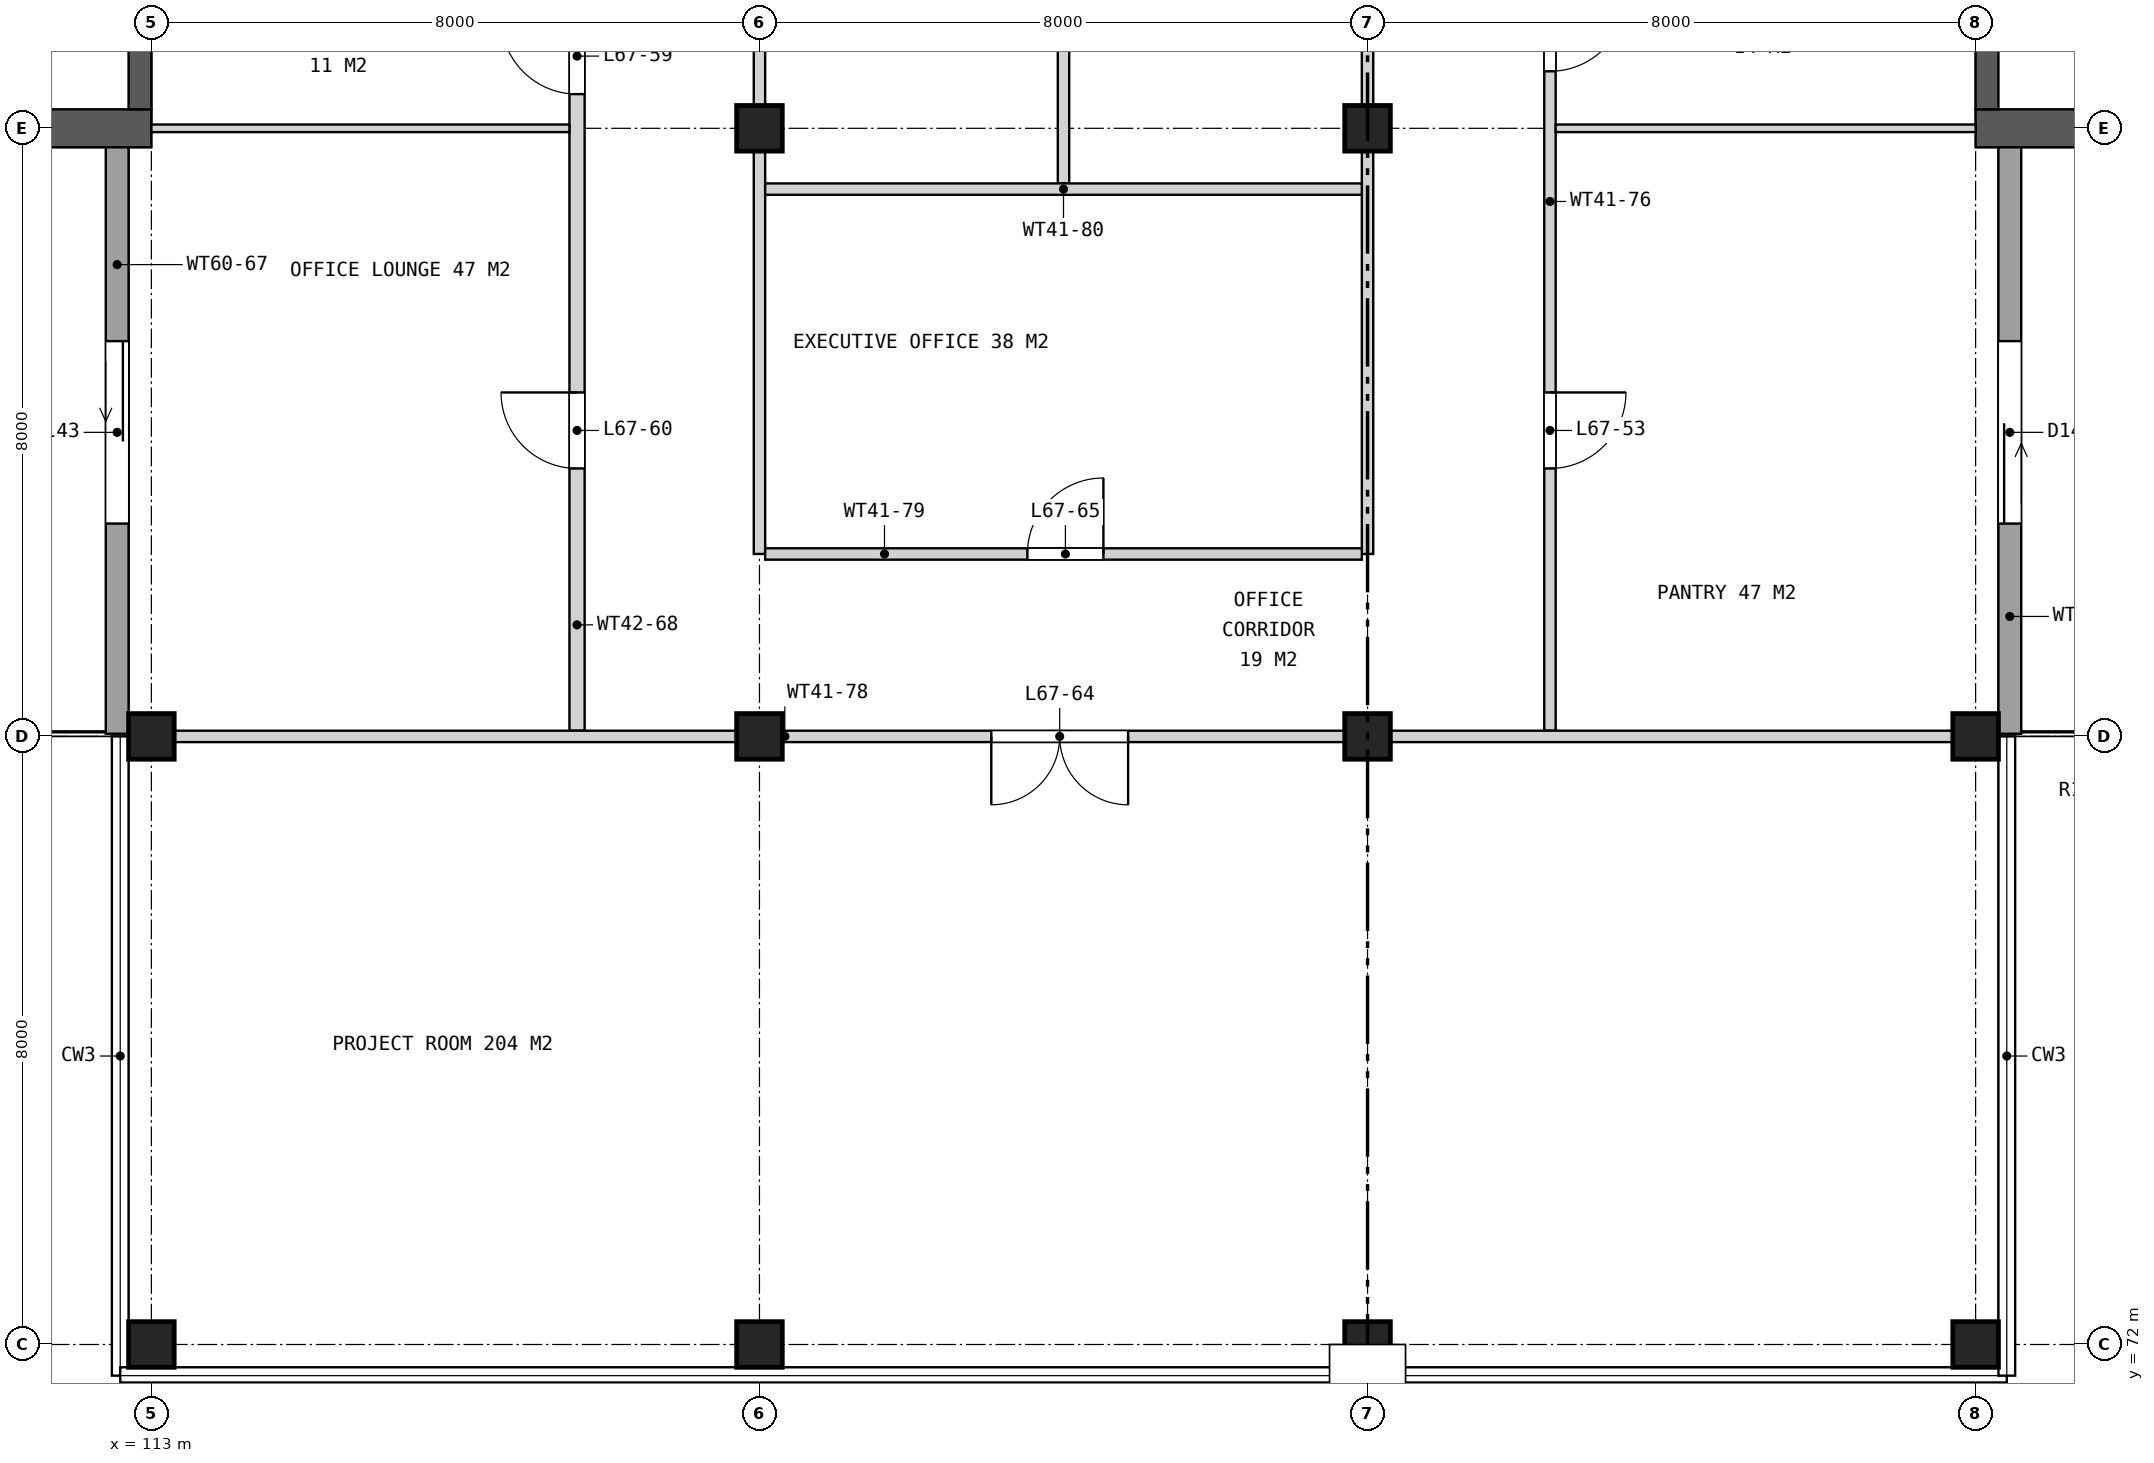
"""IFC4 building model, lengths in metres.
Left out: names, types, materials, properties, quantities, classifications, styles, units other than length and angle.
Written with IfcOpenShell. Run it as: python <this file> out.ifc"""

import sys

from ifc_helpers import new_model, si_unit, direction, frame, frame_2d, origin, origin_2d, place, context, subcontext, project, spatial, rectangle, extrude, element, fill, save


model = new_model("IFC4")
c1 = context("Model", 3, precision=1e-05, world=origin(), true_north=direction((0.0, 1.0)))
c2 = subcontext(c1, "Body", "Model", "MODEL_VIEW")
j1 = project(units=[si_unit("LENGTHUNIT", "METRE"), si_unit("PLANEANGLEUNIT", "RADIAN")], contexts=[c1])
p1 = place(None, origin())
s1 = spatial("IfcSite", under=j1, at=p1, CompositionType="ELEMENT")
p2 = place(p1, origin())
s2 = spatial("IfcBuilding", under=s1, at=p2, CompositionType="ELEMENT")
p3 = place(p2, frame((0.0, 0.0, 311.3)))
s3 = spatial("IfcBuildingStorey", under=s2, at=p3, CompositionType="ELEMENT", Elevation=311.3)
for number, where, z_axis, x_axis in (
    (1, (113.0, 72.0, 0.0), (0.0, 0.0, 1.0), (1.0, 0.0, 0.0)),
    (2, (113.0, 80.0, 0.0), (0.0, 0.0, 1.0), (1.0, 0.0, 0.0)),
    (3, (121.0, 72.0, 0.0), (0.0, 0.0, 1.0), (1.0, 0.0, 0.0)),
    (4, (121.0, 80.0, 0.0), (0.0, 0.0, 1.0), (1.0, 0.0, 0.0)),
    (5, (121.0, 88.0, 0.0), (0.0, 0.0, 1.0), (1.0, 0.0, 0.0)),
    (6, (129.0, 72.0, 0.0), (0.0, 0.0, 1.0), (1.0, 0.0, 0.0)),
    (7, (129.0, 80.0, 0.0), (0.0, 0.0, 1.0), (1.0, 0.0, 0.0)),
    (8, (129.0, 88.0, 0.0), (0.0, 0.0, 1.0), (1.0, 0.0, 0.0)),
    (9, (137.0, 72.0, 0.0), (0.0, 0.0, 1.0), (1.0, 0.0, 0.0)),
    (10, (137.0, 80.0, 0.0), (0.0, 0.0, 1.0), (1.0, 0.0, 0.0)),
):
    element("IfcColumn", number, at=place(p3, frame(where, z_axis=z_axis, x_axis=x_axis)), inside=s3, PredefinedType="COLUMN", context=c2, shape_type="SweptSolid", body=[
        extrude(rectangle(XDim=0.6, YDim=0.6, at=origin_2d()), origin(), (0.0, 0.0, 1.0), 4.2),
    ])
p4 = place(p3, frame((137.0, 88.0, 0.0), z_axis=(0.0, 0.0, 1.0), x_axis=(1.0, 0.0, 0.0)))
e11 = element("IfcWall", 11, at=p4, inside=s3, PredefinedType="SHEAR", context=c2, shape_type="SweptSolid", body=[
    extrude(rectangle(XDim=7.1, YDim=0.5, at=frame_2d((3.55, 0.0))), origin(), (0.0, 0.0, 1.0), 4.2),
])
p5 = place(p3, frame((137.15, 88.25, 0.0), z_axis=(0.0, 0.0, 1.0), x_axis=(0.0, 1.0, 0.0)))
e12 = element("IfcWall", 12, at=p5, inside=s3, PredefinedType="SHEAR", context=c2, shape_type="SweptSolid", body=[
    extrude(rectangle(XDim=6.05, YDim=0.3, at=frame_2d((3.025, 0.0))), origin(), (0.0, 0.0, 1.0), 4.2),
])
p6 = place(p3, frame((113.0, 88.0, 0.0), z_axis=(0.0, 0.0, 1.0), x_axis=(-1.0, 0.0, 0.0)))
e13 = element("IfcWall", 13, at=p6, inside=s3, PredefinedType="SHEAR", context=c2, shape_type="SweptSolid", body=[
    extrude(rectangle(XDim=7.1, YDim=0.5, at=frame_2d((3.55, 0.0))), origin(), (0.0, 0.0, 1.0), 4.2),
])
p7 = place(p3, frame((112.85, 94.3, 0.0), z_axis=(0.0, 0.0, 1.0), x_axis=(0.0, -1.0, 0.0)))
e14 = element("IfcWall", 14, at=p7, inside=s3, PredefinedType="SHEAR", context=c2, shape_type="SweptSolid", body=[
    extrude(rectangle(XDim=6.05, YDim=0.3, at=frame_2d((3.025, 0.0))), origin(), (0.0, 0.0, 1.0), 4.2),
])
p8 = place(p3, frame((112.55, 87.75, 0.0), z_axis=(0.0, 0.0, 1.0), x_axis=(0.0, -1.0, 0.0)))
e15 = element("IfcWall", 15, at=p8, inside=s3, PredefinedType="SOLIDWALL", context=c2, shape_type="SweptSolid", body=[
    extrude(rectangle(XDim=7.715, YDim=0.3, at=frame_2d((3.857, 0.0))), origin(), (0.0, 0.0, 1.0), 3.544),
])
p9 = place(p8, frame((2.55, 0.0, 0.0)))
e16 = element("IfcOpeningElement", 16, at=p9, cuts=e15, PredefinedType="OPENING", context=c2, shape_type="SweptSolid", body=[
    extrude(rectangle(XDim=2.4, YDim=2.4, at=frame_2d((1.2, 1.2))), frame((0.0, 0.16, 0.0), z_axis=(0.0, -1.0, 0.0), x_axis=(1.0, 0.0, 0.0)), (0.0, 0.0, 1.0), 0.32),
])
p10 = place(p3, frame((137.45, 80.035, 0.0), z_axis=(0.0, 0.0, 1.0), x_axis=(0.0, 1.0, 0.0)))
e17 = element("IfcWall", 17, at=p10, inside=s3, PredefinedType="SOLIDWALL", context=c2, shape_type="SweptSolid", body=[
    extrude(rectangle(XDim=7.715, YDim=0.3, at=frame_2d((3.857, 0.0))), origin(), (0.0, 0.0, 1.0), 3.544),
])
p11 = place(p10, frame((2.765, 0.0, 0.0)))
e18 = element("IfcOpeningElement", 18, at=p11, cuts=e17, PredefinedType="OPENING", context=c2, shape_type="SweptSolid", body=[
    extrude(rectangle(XDim=2.4, YDim=2.4, at=frame_2d((1.2, 1.2))), frame((0.0, 0.16, 0.0), z_axis=(0.0, -1.0, 0.0), x_axis=(1.0, 0.0, 0.0)), (0.0, 0.0, 1.0), 0.32),
])
p12 = place(p3, frame((118.6, 80.075, 0.0), z_axis=(0.0, 0.0, 1.0), x_axis=(0.0, 1.0, 0.0)))
e19 = element("IfcWall", 19, at=p12, inside=s3, PredefinedType="SOLIDWALL", context=c2, shape_type="SweptSolid", body=[
    extrude(rectangle(XDim=13.925, YDim=0.2, at=frame_2d((6.962, 0.0))), origin(), (0.0, 0.0, 1.0), 3.443),
])
p13 = place(p12, frame((12.375, 0.0, 0.0)))
e20 = element("IfcOpeningElement", 20, at=p13, cuts=e19, PredefinedType="OPENING", context=c2, shape_type="SweptSolid", body=[
    extrude(rectangle(XDim=1.0, YDim=2.1, at=frame_2d((0.5, 1.05))), frame((0.0, 0.11, 0.0), z_axis=(0.0, -1.0, 0.0), x_axis=(1.0, 0.0, 0.0)), (0.0, 0.0, 1.0), 0.22),
])
p14 = place(p12, frame((10.375, 0.0, 0.0)))
e21 = element("IfcOpeningElement", 21, at=p14, cuts=e19, PredefinedType="OPENING", context=c2, shape_type="SweptSolid", body=[
    extrude(rectangle(XDim=1.0, YDim=2.1, at=frame_2d((0.5, 1.05))), frame((0.0, 0.11, 0.0), z_axis=(0.0, -1.0, 0.0), x_axis=(1.0, 0.0, 0.0)), (0.0, 0.0, 1.0), 0.22),
])
p15 = place(p12, frame((8.375, 0.0, 0.0)))
e22 = element("IfcOpeningElement", 22, at=p15, cuts=e19, PredefinedType="OPENING", context=c2, shape_type="SweptSolid", body=[
    extrude(rectangle(XDim=1.0, YDim=2.1, at=frame_2d((0.5, 1.05))), frame((0.0, 0.11, 0.0), z_axis=(0.0, -1.0, 0.0), x_axis=(1.0, 0.0, 0.0)), (0.0, 0.0, 1.0), 0.22),
])
p16 = place(p12, frame((3.45, 0.0, 0.0)))
e23 = element("IfcOpeningElement", 23, at=p16, cuts=e19, PredefinedType="OPENING", context=c2, shape_type="SweptSolid", body=[
    extrude(rectangle(XDim=1.0, YDim=2.1, at=frame_2d((0.5, 1.05))), frame((0.0, 0.11, 0.0), z_axis=(0.0, -1.0, 0.0), x_axis=(1.0, 0.0, 0.0)), (0.0, 0.0, 1.0), 0.22),
])
p17 = place(p3, frame((121.0, 82.4, 0.0), z_axis=(0.0, 0.0, 1.0), x_axis=(0.0, 1.0, 0.0)))
e24 = element("IfcWall", 24, at=p17, inside=s3, PredefinedType="PARTITIONING", context=c2, shape_type="SweptSolid", body=[
    extrude(rectangle(XDim=35.2, YDim=0.15, at=frame_2d((17.6, 0.0))), origin(), (0.0, 0.0, 1.0), 3.443),
])
p18 = place(p17, frame((8.25, 0.0, 0.0)))
e25 = element("IfcOpeningElement", 25, at=p18, cuts=e24, PredefinedType="OPENING", context=c2, shape_type="SweptSolid", body=[
    extrude(rectangle(XDim=1.0, YDim=2.1, at=frame_2d((0.5, 1.05))), frame((0.0, 0.085, 0.0), z_axis=(0.0, -1.0, 0.0), x_axis=(1.0, 0.0, 0.0)), (0.0, 0.0, 1.0), 0.17),
])
p19 = place(p17, frame((22.15, 0.0, 0.0)))
e26 = element("IfcOpeningElement", 26, at=p19, cuts=e24, PredefinedType="OPENING", context=c2, shape_type="SweptSolid", body=[
    extrude(rectangle(XDim=1.0, YDim=2.1, at=frame_2d((0.5, 1.05))), frame((0.0, 0.085, 0.0), z_axis=(0.0, -1.0, 0.0), x_axis=(1.0, 0.0, 0.0)), (0.0, 0.0, 1.0), 0.17),
])
p20 = place(p17, frame((26.35, 0.0, 0.0)))
e27 = element("IfcOpeningElement", 27, at=p20, cuts=e24, PredefinedType="OPENING", context=c2, shape_type="SweptSolid", body=[
    extrude(rectangle(XDim=1.0, YDim=2.1, at=frame_2d((0.5, 1.05))), frame((0.0, 0.085, 0.0), z_axis=(0.0, -1.0, 0.0), x_axis=(1.0, 0.0, 0.0)), (0.0, 0.0, 1.0), 0.17),
])
p21 = place(p3, frame((125.0, 87.275, 0.0), z_axis=(0.0, 0.0, 1.0), x_axis=(0.0, 1.0, 0.0)))
e28 = element("IfcWall", 28, at=p21, inside=s3, PredefinedType="PARTITIONING", context=c2, shape_type="SweptSolid", body=[
    extrude(rectangle(XDim=7.85, YDim=0.15, at=frame_2d((3.925, 0.0))), origin(), (0.0, 0.0, 1.0), 3.443),
])
p22 = place(p3, frame((129.0, 82.4, 0.0), z_axis=(0.0, 0.0, 1.0), x_axis=(0.0, 1.0, 0.0)))
e29 = element("IfcWall", 29, at=p22, inside=s3, PredefinedType="PARTITIONING", context=c2, shape_type="SweptSolid", body=[
    extrude(rectangle(XDim=35.2, YDim=0.15, at=frame_2d((17.6, 0.0))), origin(), (0.0, 0.0, 1.0), 3.443),
])
p23 = place(p22, frame((8.25, 0.0, 0.0)))
e30 = element("IfcOpeningElement", 30, at=p23, cuts=e29, PredefinedType="OPENING", context=c2, shape_type="SweptSolid", body=[
    extrude(rectangle(XDim=1.0, YDim=2.1, at=frame_2d((0.5, 1.05))), frame((0.0, 0.085, 0.0), z_axis=(0.0, -1.0, 0.0), x_axis=(1.0, 0.0, 0.0)), (0.0, 0.0, 1.0), 0.17),
])
p24 = place(p22, frame((15.85, 0.0, 0.0)))
e31 = element("IfcOpeningElement", 31, at=p24, cuts=e29, PredefinedType="OPENING", context=c2, shape_type="SweptSolid", body=[
    extrude(rectangle(XDim=1.0, YDim=2.1, at=frame_2d((0.5, 1.05))), frame((0.0, 0.085, 0.0), z_axis=(0.0, -1.0, 0.0), x_axis=(1.0, 0.0, 0.0)), (0.0, 0.0, 1.0), 0.17),
])
p25 = place(p22, frame((26.35, 0.0, 0.0)))
e32 = element("IfcOpeningElement", 32, at=p25, cuts=e29, PredefinedType="OPENING", context=c2, shape_type="SweptSolid", body=[
    extrude(rectangle(XDim=1.0, YDim=2.1, at=frame_2d((0.5, 1.05))), frame((0.0, 0.085, 0.0), z_axis=(0.0, -1.0, 0.0), x_axis=(1.0, 0.0, 0.0)), (0.0, 0.0, 1.0), 0.17),
])
p26 = place(p3, frame((131.4, 80.075, 0.0), z_axis=(0.0, 0.0, 1.0), x_axis=(0.0, 1.0, 0.0)))
e33 = element("IfcWall", 33, at=p26, inside=s3, PredefinedType="PARTITIONING", context=c2, shape_type="SweptSolid", body=[
    extrude(rectangle(XDim=13.925, YDim=0.15, at=frame_2d((6.962, 0.0))), origin(), (0.0, 0.0, 1.0), 3.443),
])
p27 = place(p26, frame((11.675, 0.0, 0.0)))
e34 = element("IfcOpeningElement", 34, at=p27, cuts=e33, PredefinedType="OPENING", context=c2, shape_type="SweptSolid", body=[
    extrude(rectangle(XDim=1.0, YDim=2.1, at=frame_2d((0.5, 1.05))), frame((0.0, 0.085, 0.0), z_axis=(0.0, -1.0, 0.0), x_axis=(1.0, 0.0, 0.0)), (0.0, 0.0, 1.0), 0.17),
])
p28 = place(p26, frame((8.675, 0.0, 0.0)))
e35 = element("IfcOpeningElement", 35, at=p28, cuts=e33, PredefinedType="OPENING", context=c2, shape_type="SweptSolid", body=[
    extrude(rectangle(XDim=1.0, YDim=2.1, at=frame_2d((0.5, 1.05))), frame((0.0, 0.085, 0.0), z_axis=(0.0, -1.0, 0.0), x_axis=(1.0, 0.0, 0.0)), (0.0, 0.0, 1.0), 0.17),
])
p29 = place(p26, frame((3.45, 0.0, 0.0)))
e36 = element("IfcOpeningElement", 36, at=p29, cuts=e33, PredefinedType="OPENING", context=c2, shape_type="SweptSolid", body=[
    extrude(rectangle(XDim=1.0, YDim=2.1, at=frame_2d((0.5, 1.05))), frame((0.0, 0.085, 0.0), z_axis=(0.0, -1.0, 0.0), x_axis=(1.0, 0.0, 0.0)), (0.0, 0.0, 1.0), 0.17),
])
p30 = place(p3, frame((112.78, 80.0, 0.0), z_axis=(0.0, 0.0, 1.0), x_axis=(1.0, 0.0, 0.0)))
e37 = element("IfcWall", 37, at=p30, inside=s3, PredefinedType="PARTITIONING", context=c2, shape_type="SweptSolid", body=[
    extrude(rectangle(XDim=24.44, YDim=0.15, at=frame_2d((12.22, 0.0))), origin(), (0.0, 0.0, 1.0), 3.443),
])
p31 = place(p30, frame((11.27, 0.0, 0.0)))
e38 = element("IfcOpeningElement", 38, at=p31, cuts=e37, PredefinedType="OPENING", context=c2, shape_type="SweptSolid", body=[
    extrude(rectangle(XDim=1.8, YDim=2.1, at=frame_2d((0.9, 1.05))), frame((0.0, 0.085, 0.0), z_axis=(0.0, -1.0, 0.0), x_axis=(1.0, 0.0, 0.0)), (0.0, 0.0, 1.0), 0.17),
])
p32 = place(p3, frame((121.075, 82.4, 0.0), z_axis=(0.0, 0.0, 1.0), x_axis=(1.0, 0.0, 0.0)))
e39 = element("IfcWall", 39, at=p32, inside=s3, PredefinedType="PARTITIONING", context=c2, shape_type="SweptSolid", body=[
    extrude(rectangle(XDim=7.85, YDim=0.15, at=frame_2d((3.925, 0.0))), origin(), (0.0, 0.0, 1.0), 3.443),
])
p33 = place(p32, frame((3.45, 0.0, 0.0)))
e40 = element("IfcOpeningElement", 40, at=p33, cuts=e39, PredefinedType="OPENING", context=c2, shape_type="SweptSolid", body=[
    extrude(rectangle(XDim=1.0, YDim=2.1, at=frame_2d((0.5, 1.05))), frame((0.0, 0.085, 0.0), z_axis=(0.0, -1.0, 0.0), x_axis=(1.0, 0.0, 0.0)), (0.0, 0.0, 1.0), 0.17),
])
p34 = place(p3, frame((121.075, 87.2, 0.0), z_axis=(0.0, 0.0, 1.0), x_axis=(1.0, 0.0, 0.0)))
e41 = element("IfcWall", 41, at=p34, inside=s3, PredefinedType="PARTITIONING", context=c2, shape_type="SweptSolid", body=[
    extrude(rectangle(XDim=7.85, YDim=0.15, at=frame_2d((3.925, 0.0))), origin(), (0.0, 0.0, 1.0), 3.443),
])
p35 = place(p3, frame((113.0, 88.0, 0.0), z_axis=(0.0, 0.0, 1.0), x_axis=(1.0, 0.0, 0.0)))
e42 = element("IfcWall", 42, at=p35, inside=s3, PredefinedType="PARTITIONING", context=c2, shape_type="SweptSolid", body=[
    extrude(rectangle(XDim=5.5, YDim=0.1, at=frame_2d((2.75, 0.0))), origin(), (0.0, 0.0, 1.0), 3.443),
])
p36 = place(p3, frame((131.475, 88.0, 0.0), z_axis=(0.0, 0.0, 1.0), x_axis=(1.0, 0.0, 0.0)))
e43 = element("IfcWall", 43, at=p36, inside=s3, PredefinedType="PARTITIONING", context=c2, shape_type="SweptSolid", body=[
    extrude(rectangle(XDim=5.525, YDim=0.1, at=frame_2d((2.762, 0.0))), origin(), (0.0, 0.0, 1.0), 3.443),
])
p37 = place(p9, frame((2.4, 0.0, 0.0), z_axis=(0.0, 0.0, 1.0), x_axis=(-1.0, 0.0, 0.0)))
e44 = element("IfcDoor", 44, at=p37, inside=s3, OperationType="SLIDING_TO_LEFT", PredefinedType="DOOR", context=c2, shape_type="SweptSolid", body=[
    extrude(rectangle(XDim=2.4, YDim=2.4, at=frame_2d((1.2, 1.2))), frame((0.0, 0.025, 0.0), z_axis=(0.0, -1.0, 0.0), x_axis=(1.0, 0.0, 0.0)), (0.0, 0.0, 1.0), 0.05),
])
fill(e16, e44)
p38 = place(p11, frame((2.4, 0.0, 0.0), z_axis=(0.0, 0.0, 1.0), x_axis=(-1.0, 0.0, 0.0)))
e45 = element("IfcDoor", 45, at=p38, inside=s3, OperationType="SLIDING_TO_LEFT", PredefinedType="DOOR", context=c2, shape_type="SweptSolid", body=[
    extrude(rectangle(XDim=2.4, YDim=2.4, at=frame_2d((1.2, 1.2))), frame((0.0, 0.025, 0.0), z_axis=(0.0, -1.0, 0.0), x_axis=(1.0, 0.0, 0.0)), (0.0, 0.0, 1.0), 0.05),
])
fill(e18, e45)
p39 = place(p28, frame((1.0, 0.0, 0.0), z_axis=(0.0, 0.0, 1.0), x_axis=(-1.0, 0.0, 0.0)))
e46 = element("IfcDoor", 46, at=p39, inside=s3, OperationType="SINGLE_SWING_LEFT", PredefinedType="DOOR", context=c2, shape_type="SweptSolid", body=[
    extrude(rectangle(XDim=1.0, YDim=2.1, at=frame_2d((0.5, 1.05))), frame((0.0, 0.025, 0.0), z_axis=(0.0, -1.0, 0.0), x_axis=(1.0, 0.0, 0.0)), (0.0, 0.0, 1.0), 0.05),
])
fill(e35, e46)
p40 = place(p29, frame((1.0, 0.0, 0.0), z_axis=(0.0, 0.0, 1.0), x_axis=(-1.0, 0.0, 0.0)))
e47 = element("IfcDoor", 47, at=p40, inside=s3, OperationType="SINGLE_SWING_LEFT", PredefinedType="DOOR", context=c2, shape_type="SweptSolid", body=[
    extrude(rectangle(XDim=1.0, YDim=2.1, at=frame_2d((0.5, 1.05))), frame((0.0, 0.025, 0.0), z_axis=(0.0, -1.0, 0.0), x_axis=(1.0, 0.0, 0.0)), (0.0, 0.0, 1.0), 0.05),
])
fill(e36, e47)
p41 = place(p15, origin())
e48 = element("IfcDoor", 48, at=p41, inside=s3, OperationType="SINGLE_SWING_RIGHT", PredefinedType="DOOR", context=c2, shape_type="SweptSolid", body=[
    extrude(rectangle(XDim=1.0, YDim=2.1, at=frame_2d((0.5, 1.05))), frame((0.0, 0.025, 0.0), z_axis=(0.0, -1.0, 0.0), x_axis=(1.0, 0.0, 0.0)), (0.0, 0.0, 1.0), 0.05),
])
fill(e22, e48)
p42 = place(p16, origin())
e49 = element("IfcDoor", 49, at=p42, inside=s3, OperationType="SINGLE_SWING_RIGHT", PredefinedType="DOOR", context=c2, shape_type="SweptSolid", body=[
    extrude(rectangle(XDim=1.0, YDim=2.1, at=frame_2d((0.5, 1.05))), frame((0.0, 0.025, 0.0), z_axis=(0.0, -1.0, 0.0), x_axis=(1.0, 0.0, 0.0)), (0.0, 0.0, 1.0), 0.05),
])
fill(e23, e49)
p43 = place(p31, frame((1.8, 0.0, 0.0), z_axis=(0.0, 0.0, 1.0), x_axis=(-1.0, 0.0, 0.0)))
e50 = element("IfcDoor", 50, at=p43, inside=s3, OperationType="DOUBLE_DOOR_SINGLE_SWING", PredefinedType="DOOR", context=c2, shape_type="SweptSolid", body=[
    extrude(rectangle(XDim=1.8, YDim=2.1, at=frame_2d((0.9, 1.05))), frame((0.0, 0.025, 0.0), z_axis=(0.0, -1.0, 0.0), x_axis=(1.0, 0.0, 0.0)), (0.0, 0.0, 1.0), 0.05),
])
fill(e38, e50)
p44 = place(p33, origin())
e51 = element("IfcDoor", 51, at=p44, inside=s3, OperationType="SINGLE_SWING_RIGHT", PredefinedType="DOOR", context=c2, shape_type="SweptSolid", body=[
    extrude(rectangle(XDim=1.0, YDim=2.1, at=frame_2d((0.5, 1.05))), frame((0.0, 0.025, 0.0), z_axis=(0.0, -1.0, 0.0), x_axis=(1.0, 0.0, 0.0)), (0.0, 0.0, 1.0), 0.05),
])
fill(e40, e51)
save(model, sys.argv[1])
